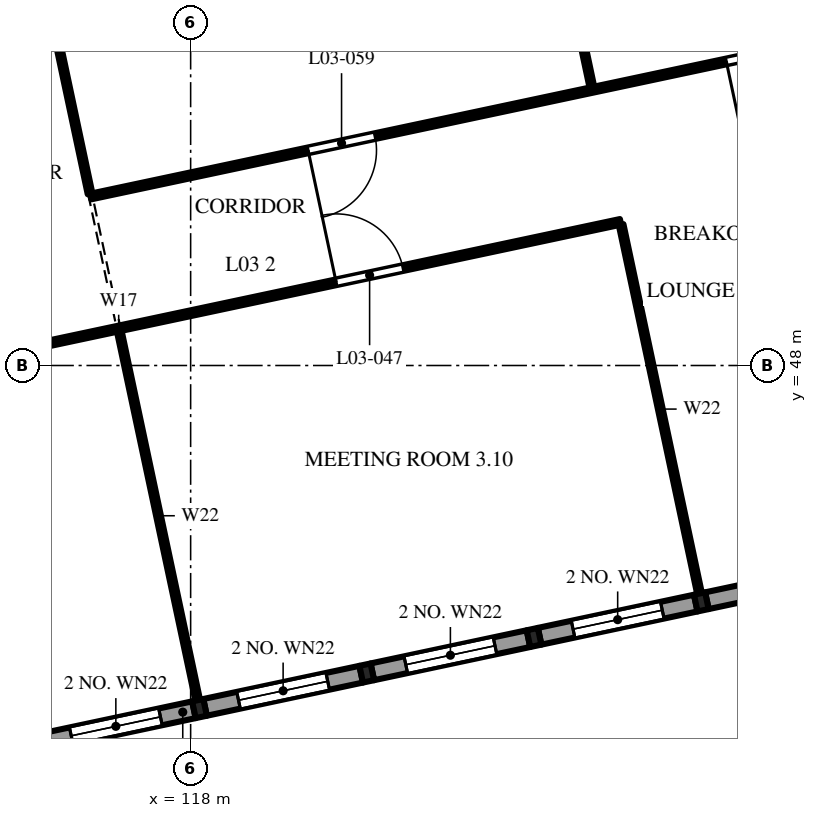
"""IFC4 building model, lengths in metres.
Left out: names, types, materials, properties, quantities, classifications, styles, units other than length and angle.
Written with IfcOpenShell. Run it as: python <this file> out.ifc"""

import sys

from ifc_helpers import new_model, si_unit, direction, frame, frame_2d, origin, origin_2d, place, context, subcontext, project, spatial, polyline, rectangle, i_section, outline, extrude, element, fill, save


model = new_model("IFC4")
c1 = context("Model", 3, precision=1e-05, world=origin(), true_north=direction((0.0, 1.0)))
c2 = subcontext(c1, "Body", "Model", "MODEL_VIEW")
j1 = project(units=[si_unit("LENGTHUNIT", "METRE"), si_unit("PLANEANGLEUNIT", "RADIAN")], contexts=[c1])
p1 = place(None, origin())
s1 = spatial("IfcSite", under=j1, at=p1, CompositionType="ELEMENT")
p2 = place(p1, origin())
s2 = spatial("IfcBuilding", under=s1, at=p2, CompositionType="ELEMENT")
p3 = place(p2, frame((0.0, 0.0, 16.8)))
s3 = spatial("IfcBuildingStorey", under=s2, at=p3, CompositionType="ELEMENT", Elevation=16.8)
for number, where, z_axis, x_axis in (
    (1, (118.233, 38.972, 0.0), (0.0, 0.0, 1.0), (0.978, 0.208, 0.0)),
    (2, (122.634, 39.908, 0.0), (0.0, 0.0, 1.0), (0.978, 0.208, 0.0)),
    (3, (127.036, 40.843, 0.0), (0.0, 0.0, 1.0), (0.978, 0.208, 0.0)),
    (4, (131.438, 41.779, 0.0), (0.0, 0.0, 1.0), (0.978, 0.208, 0.0)),
):
    element("IfcColumn", number, at=place(p3, frame(where, z_axis=z_axis, x_axis=x_axis)), inside=s3, PredefinedType="COLUMN", context=c2, shape_type="SweptSolid", body=[
        extrude(i_section(OverallWidth=0.3, OverallDepth=0.45, WebThickness=0.014, FlangeThickness=0.026, FilletRadius=0.027, at=origin_2d()), origin(), (0.0, 0.0, 1.0), 4.8),
    ])
p4 = place(p3, frame((113.978, 38.068, 0.0), z_axis=(0.0, 0.0, 1.0), x_axis=(0.978143927149, 0.207928972925, 0.0)))
e5 = element("IfcWall", 5, at=p4, inside=s3, PredefinedType="SOLIDWALL", context=c2, shape_type="SweptSolid", body=[
    extrude(outline(polyline([(0.0, 0.0), (4.2, 0.0), (4.2, 11.242), (0.0, 11.017), (0.0, 0.0)])), frame((0.0, 0.225, 0.0), z_axis=(0.0, -1.0, 0.0), x_axis=(1.0, 0.0, 0.0)), (0.0, 0.0, 1.0), 0.45),
])
p5 = place(p4, frame((0.9, 0.0, 0.9)))
e6 = element("IfcOpeningElement", 6, at=p5, cuts=e5, PredefinedType="OPENING", context=c2, shape_type="SweptSolid", body=[
    extrude(rectangle(XDim=2.4, YDim=2.4, at=frame_2d((1.2, 1.2))), frame((0.0, 0.235, 0.0), z_axis=(0.0, -1.0, 0.0), x_axis=(1.0, 0.0, 0.0)), (0.0, 0.0, 1.0), 0.47),
])
p6 = place(p4, frame((0.9, 0.0, 5.1)))
e7 = element("IfcOpeningElement", 7, at=p6, cuts=e5, PredefinedType="OPENING", context=c2, shape_type="SweptSolid", body=[
    extrude(rectangle(XDim=2.4, YDim=2.4, at=frame_2d((1.2, 1.2))), frame((0.0, 0.235, 0.0), z_axis=(0.0, -1.0, 0.0), x_axis=(1.0, 0.0, 0.0)), (0.0, 0.0, 1.0), 0.47),
])
p7 = place(p3, frame((118.379, 39.003, 0.0), z_axis=(0.0, 0.0, 1.0), x_axis=(0.978143927149, 0.207928972925, 0.0)))
e8 = element("IfcWall", 8, at=p7, inside=s3, PredefinedType="SOLIDWALL", context=c2, shape_type="SweptSolid", body=[
    extrude(outline(polyline([(0.0, 0.0), (4.2, 0.0), (4.2, 11.483), (0.0, 11.258), (0.0, 0.0)])), frame((0.0, 0.225, 0.0), z_axis=(0.0, -1.0, 0.0), x_axis=(1.0, 0.0, 0.0)), (0.0, 0.0, 1.0), 0.45),
])
p8 = place(p7, frame((0.9, 0.0, 0.9)))
e9 = element("IfcOpeningElement", 9, at=p8, cuts=e8, PredefinedType="OPENING", context=c2, shape_type="SweptSolid", body=[
    extrude(rectangle(XDim=2.4, YDim=2.4, at=frame_2d((1.2, 1.2))), frame((0.0, 0.235, 0.0), z_axis=(0.0, -1.0, 0.0), x_axis=(1.0, 0.0, 0.0)), (0.0, 0.0, 1.0), 0.47),
])
p9 = place(p7, frame((0.9, 0.0, 5.1)))
e10 = element("IfcOpeningElement", 10, at=p9, cuts=e8, PredefinedType="OPENING", context=c2, shape_type="SweptSolid", body=[
    extrude(rectangle(XDim=2.4, YDim=2.4, at=frame_2d((1.2, 1.2))), frame((0.0, 0.235, 0.0), z_axis=(0.0, -1.0, 0.0), x_axis=(1.0, 0.0, 0.0)), (0.0, 0.0, 1.0), 0.47),
])
p10 = place(p3, frame((122.781, 39.939, 0.0), z_axis=(0.0, 0.0, 1.0), x_axis=(0.978155748334, 0.207873355681, 0.0)))
e11 = element("IfcWall", 11, at=p10, inside=s3, PredefinedType="SOLIDWALL", context=c2, shape_type="SweptSolid", body=[
    extrude(outline(polyline([(0.0, 0.0), (4.2, 0.0), (4.2, 11.723), (0.0, 11.499), (0.0, 0.0)])), frame((0.0, 0.225, 0.0), z_axis=(0.0, -1.0, 0.0), x_axis=(1.0, 0.0, 0.0)), (0.0, 0.0, 1.0), 0.45),
])
p11 = place(p10, frame((0.9, 0.0, 0.9)))
e12 = element("IfcOpeningElement", 12, at=p11, cuts=e11, PredefinedType="OPENING", context=c2, shape_type="SweptSolid", body=[
    extrude(rectangle(XDim=2.4, YDim=2.4, at=frame_2d((1.2, 1.2))), frame((0.0, 0.235, 0.0), z_axis=(0.0, -1.0, 0.0), x_axis=(1.0, 0.0, 0.0)), (0.0, 0.0, 1.0), 0.47),
])
p12 = place(p10, frame((0.9, 0.0, 5.1)))
e13 = element("IfcOpeningElement", 13, at=p12, cuts=e11, PredefinedType="OPENING", context=c2, shape_type="SweptSolid", body=[
    extrude(rectangle(XDim=2.4, YDim=2.4, at=frame_2d((1.2, 1.2))), frame((0.0, 0.235, 0.0), z_axis=(0.0, -1.0, 0.0), x_axis=(1.0, 0.0, 0.0)), (0.0, 0.0, 1.0), 0.47),
])
p13 = place(p3, frame((127.183, 40.875, 0.0), z_axis=(0.0, 0.0, 1.0), x_axis=(0.978146440129, 0.207917150959, 0.0)))
e14 = element("IfcWall", 14, at=p13, inside=s3, PredefinedType="SOLIDWALL", context=c2, shape_type="SweptSolid", body=[
    extrude(outline(polyline([(0.0, 0.0), (4.2, 0.0), (4.2, 11.964), (0.0, 11.74), (0.0, 0.0)])), frame((0.0, 0.225, 0.0), z_axis=(0.0, -1.0, 0.0), x_axis=(1.0, 0.0, 0.0)), (0.0, 0.0, 1.0), 0.45),
])
p14 = place(p13, frame((0.9, 0.0, 0.9)))
e15 = element("IfcOpeningElement", 15, at=p14, cuts=e14, PredefinedType="OPENING", context=c2, shape_type="SweptSolid", body=[
    extrude(rectangle(XDim=2.4, YDim=2.4, at=frame_2d((1.2, 1.2))), frame((0.0, 0.235, 0.0), z_axis=(0.0, -1.0, 0.0), x_axis=(1.0, 0.0, 0.0)), (0.0, 0.0, 1.0), 0.47),
])
p15 = place(p13, frame((0.9, 0.0, 5.1)))
e16 = element("IfcOpeningElement", 16, at=p15, cuts=e14, PredefinedType="OPENING", context=c2, shape_type="SweptSolid", body=[
    extrude(rectangle(XDim=2.4, YDim=2.4, at=frame_2d((1.2, 1.2))), frame((0.0, 0.235, 0.0), z_axis=(0.0, -1.0, 0.0), x_axis=(1.0, 0.0, 0.0)), (0.0, 0.0, 1.0), 0.47),
])
p16 = place(p3, frame((131.584, 41.81, 0.0), z_axis=(0.0, 0.0, 1.0), x_axis=(0.978146440129, 0.207917150959, 0.0)))
e17 = element("IfcWall", 17, at=p16, inside=s3, PredefinedType="SOLIDWALL", context=c2, shape_type="SweptSolid", body=[
    extrude(outline(polyline([(0.0, 0.0), (4.2, 0.0), (4.2, 12.205), (0.0, 11.98), (0.0, 0.0)])), frame((0.0, 0.225, 0.0), z_axis=(0.0, -1.0, 0.0), x_axis=(1.0, 0.0, 0.0)), (0.0, 0.0, 1.0), 0.45),
])
p17 = place(p16, frame((0.9, 0.0, 0.45)))
e18 = element("IfcOpeningElement", 18, at=p17, cuts=e17, PredefinedType="OPENING", context=c2, shape_type="SweptSolid", body=[
    extrude(rectangle(XDim=2.4, YDim=3.3, at=frame_2d((1.2, 1.65))), frame((0.0, 0.235, 0.0), z_axis=(0.0, -1.0, 0.0), x_axis=(1.0, 0.0, 0.0)), (0.0, 0.0, 1.0), 0.47),
])
p18 = place(p16, frame((0.9, 0.0, 5.1)))
e19 = element("IfcOpeningElement", 19, at=p18, cuts=e17, PredefinedType="OPENING", context=c2, shape_type="SweptSolid", body=[
    extrude(rectangle(XDim=2.4, YDim=2.4, at=frame_2d((1.2, 1.2))), frame((0.0, 0.235, 0.0), z_axis=(0.0, -1.0, 0.0), x_axis=(1.0, 0.0, 0.0)), (0.0, 0.0, 1.0), 0.47),
])
p19 = place(p3, frame((80.893, 41.489, 0.0), z_axis=(0.0, 0.0, 1.0), x_axis=(0.97814724207, 0.20791337819, 0.0)))
e20 = element("IfcWall", 20, at=p19, inside=s3, PredefinedType="PARTITIONING", context=c2, shape_type="SweptSolid", body=[
    extrude(outline(polyline([(0.0, 0.0), (49.5, 0.0), (49.5, 9.336), (0.0, 6.688), (0.0, 0.0)])), frame((0.0, 0.075, 0.0), z_axis=(0.0, -1.0, 0.0), x_axis=(1.0, 0.0, 0.0)), (0.0, 0.0, 1.0), 0.15),
])
p20 = place(p19, frame((5.85, 0.0, 0.0)))
e21 = element("IfcOpeningElement", 21, at=p20, cuts=e20, PredefinedType="OPENING", context=c2, shape_type="SweptSolid", body=[
    extrude(rectangle(XDim=1.8, YDim=2.1, at=frame_2d((0.9, 1.05))), frame((0.0, 0.085, 0.0), z_axis=(0.0, -1.0, 0.0), x_axis=(1.0, 0.0, 0.0)), (0.0, 0.0, 1.0), 0.17),
])
p21 = place(p19, frame((17.25, 0.0, 0.0)))
e22 = element("IfcOpeningElement", 22, at=p21, cuts=e20, PredefinedType="OPENING", context=c2, shape_type="SweptSolid", body=[
    extrude(rectangle(XDim=1.5, YDim=2.1, at=frame_2d((0.75, 1.05))), frame((0.0, 0.085, 0.0), z_axis=(0.0, -1.0, 0.0), x_axis=(1.0, 0.0, 0.0)), (0.0, 0.0, 1.0), 0.17),
])
p22 = place(p19, frame((28.35, 0.0, 0.0)))
e23 = element("IfcOpeningElement", 23, at=p22, cuts=e20, PredefinedType="OPENING", context=c2, shape_type="SweptSolid", body=[
    extrude(rectangle(XDim=1.8, YDim=2.1, at=frame_2d((0.9, 1.05))), frame((0.0, 0.085, 0.0), z_axis=(0.0, -1.0, 0.0), x_axis=(1.0, 0.0, 0.0)), (0.0, 0.0, 1.0), 0.17),
])
p23 = place(p19, frame((41.85, 0.0, 0.0)))
e24 = element("IfcOpeningElement", 24, at=p23, cuts=e20, PredefinedType="OPENING", context=c2, shape_type="SweptSolid", body=[
    extrude(rectangle(XDim=1.8, YDim=2.1, at=frame_2d((0.9, 1.05))), frame((0.0, 0.085, 0.0), z_axis=(0.0, -1.0, 0.0), x_axis=(1.0, 0.0, 0.0)), (0.0, 0.0, 1.0), 0.17),
])
p24 = place(p3, frame((118.186, 39.192, 0.0), z_axis=(0.0, 0.0, 1.0), x_axis=(-0.207904355568, 0.978149159861, 0.0)))
e25 = element("IfcWall", 25, at=p24, inside=s3, PredefinedType="PARTITIONING", context=c2, shape_type="SweptSolid", body=[
    extrude(outline(polyline([(0.0, 0.0), (9.925, 0.0), (9.925, 7.899), (0.0, 7.899), (0.0, 0.0)])), frame((0.0, 0.062, 0.0), z_axis=(0.0, -1.0, 0.0), x_axis=(1.0, 0.0, 0.0)), (0.0, 0.0, 1.0), 0.125),
])
p25 = place(p3, frame((131.391, 41.999, 0.0), z_axis=(0.0, 0.0, 1.0), x_axis=(-0.20790935802, 0.978148096582, 0.0)))
e26 = element("IfcWall", 26, at=p25, inside=s3, PredefinedType="PARTITIONING", context=c2, shape_type="SweptSolid", body=[
    extrude(outline(polyline([(0.0, 0.0), (9.925, 0.0), (9.925, 8.622), (0.0, 8.622), (0.0, 0.0)])), frame((0.0, 0.062, 0.0), z_axis=(0.0, -1.0, 0.0), x_axis=(1.0, 0.0, 0.0)), (0.0, 0.0, 1.0), 0.125),
])
p26 = place(p3, frame((115.369, 52.446, 0.0), z_axis=(0.0, 0.0, 1.0), x_axis=(0.978147680869, 0.207911313813, 0.0)))
e27 = element("IfcWall", 27, at=p26, inside=s3, PredefinedType="PARTITIONING", context=c2, shape_type="SweptSolid", body=[
    extrude(outline(polyline([(0.0, 0.0), (40.5, 0.0), (40.5, 10.595), (0.0, 8.428), (0.0, 0.0)])), frame((0.0, 0.075, 0.0), z_axis=(0.0, -1.0, 0.0), x_axis=(1.0, 0.0, 0.0)), (0.0, 0.0, 1.0), 0.15),
])
p27 = place(p26, frame((5.85, 0.0, 0.0)))
e28 = element("IfcOpeningElement", 28, at=p27, cuts=e27, PredefinedType="OPENING", context=c2, shape_type="SweptSolid", body=[
    extrude(rectangle(XDim=1.8, YDim=2.1, at=frame_2d((0.9, 1.05))), frame((0.0, 0.085, 0.0), z_axis=(0.0, -1.0, 0.0), x_axis=(1.0, 0.0, 0.0)), (0.0, 0.0, 1.0), 0.17),
])
p28 = place(p26, frame((17.1, 0.0, 0.0)))
e29 = element("IfcOpeningElement", 29, at=p28, cuts=e27, PredefinedType="OPENING", context=c2, shape_type="SweptSolid", body=[
    extrude(rectangle(XDim=1.8, YDim=2.1, at=frame_2d((0.9, 1.05))), frame((0.0, 0.085, 0.0), z_axis=(0.0, -1.0, 0.0), x_axis=(1.0, 0.0, 0.0)), (0.0, 0.0, 1.0), 0.17),
])
p29 = place(p26, frame((28.35, 0.0, 0.0)))
e30 = element("IfcOpeningElement", 30, at=p29, cuts=e27, PredefinedType="OPENING", context=c2, shape_type="SweptSolid", body=[
    extrude(rectangle(XDim=1.8, YDim=2.1, at=frame_2d((0.9, 1.05))), frame((0.0, 0.085, 0.0), z_axis=(0.0, -1.0, 0.0), x_axis=(1.0, 0.0, 0.0)), (0.0, 0.0, 1.0), 0.17),
])
p30 = place(p26, frame((37.75, 0.0, 0.0)))
e31 = element("IfcOpeningElement", 31, at=p30, cuts=e27, PredefinedType="OPENING", context=c2, shape_type="SweptSolid", body=[
    extrude(rectangle(XDim=1.0, YDim=2.1, at=frame_2d((0.5, 1.05))), frame((0.0, 0.085, 0.0), z_axis=(0.0, -1.0, 0.0), x_axis=(1.0, 0.0, 0.0)), (0.0, 0.0, 1.0), 0.17),
])
p31 = place(p3, frame((113.29, 62.228, 0.0), z_axis=(0.0, 0.0, 1.0), x_axis=(0.20790935802, -0.978148096582, 0.0)))
e32 = element("IfcWall", 32, at=p31, inside=s3, PredefinedType="PARTITIONING", context=c2, shape_type="SweptSolid", body=[
    extrude(outline(polyline([(0.0, 0.0), (9.925, 0.0), (9.925, 7.899), (0.0, 7.899), (0.0, 0.0)])), frame((0.0, 0.062, 0.0), z_axis=(0.0, -1.0, 0.0), x_axis=(1.0, 0.0, 0.0)), (0.0, 0.0, 1.0), 0.125),
])
p32 = place(p3, frame((126.495, 65.034, 0.0), z_axis=(0.0, 0.0, 1.0), x_axis=(0.207904355568, -0.978149159861, 0.0)))
e33 = element("IfcWall", 33, at=p32, inside=s3, PredefinedType="PARTITIONING", context=c2, shape_type="SweptSolid", body=[
    extrude(outline(polyline([(0.0, 0.0), (9.925, 0.0), (9.925, 8.622), (0.0, 8.622), (0.0, 0.0)])), frame((0.0, 0.062, 0.0), z_axis=(0.0, -1.0, 0.0), x_axis=(1.0, 0.0, 0.0)), (0.0, 0.0, 1.0), 0.125),
])
p33 = place(p5, origin())
e34 = element("IfcWindow", 34, at=p33, inside=s3, PartitioningType="SINGLE_PANEL", PredefinedType="WINDOW", context=c2, shape_type="SweptSolid", body=[
    extrude(rectangle(XDim=2.4, YDim=2.4, at=frame_2d((1.2, 1.2))), frame((0.0, 0.03, 0.0), z_axis=(0.0, -1.0, 0.0), x_axis=(1.0, 0.0, 0.0)), (0.0, 0.0, 1.0), 0.06),
])
fill(e6, e34)
p34 = place(p6, origin())
e35 = element("IfcWindow", 35, at=p34, inside=s3, PartitioningType="SINGLE_PANEL", PredefinedType="WINDOW", context=c2, shape_type="SweptSolid", body=[
    extrude(rectangle(XDim=2.4, YDim=2.4, at=frame_2d((1.2, 1.2))), frame((0.0, 0.03, 0.0), z_axis=(0.0, -1.0, 0.0), x_axis=(1.0, 0.0, 0.0)), (0.0, 0.0, 1.0), 0.06),
])
fill(e7, e35)
p35 = place(p8, origin())
e36 = element("IfcWindow", 36, at=p35, inside=s3, PartitioningType="SINGLE_PANEL", PredefinedType="WINDOW", context=c2, shape_type="SweptSolid", body=[
    extrude(rectangle(XDim=2.4, YDim=2.4, at=frame_2d((1.2, 1.2))), frame((0.0, 0.03, 0.0), z_axis=(0.0, -1.0, 0.0), x_axis=(1.0, 0.0, 0.0)), (0.0, 0.0, 1.0), 0.06),
])
fill(e9, e36)
p36 = place(p9, origin())
e37 = element("IfcWindow", 37, at=p36, inside=s3, PartitioningType="SINGLE_PANEL", PredefinedType="WINDOW", context=c2, shape_type="SweptSolid", body=[
    extrude(rectangle(XDim=2.4, YDim=2.4, at=frame_2d((1.2, 1.2))), frame((0.0, 0.03, 0.0), z_axis=(0.0, -1.0, 0.0), x_axis=(1.0, 0.0, 0.0)), (0.0, 0.0, 1.0), 0.06),
])
fill(e10, e37)
p37 = place(p11, origin())
e38 = element("IfcWindow", 38, at=p37, inside=s3, PartitioningType="SINGLE_PANEL", PredefinedType="WINDOW", context=c2, shape_type="SweptSolid", body=[
    extrude(rectangle(XDim=2.4, YDim=2.4, at=frame_2d((1.2, 1.2))), frame((0.0, 0.03, 0.0), z_axis=(0.0, -1.0, 0.0), x_axis=(1.0, 0.0, 0.0)), (0.0, 0.0, 1.0), 0.06),
])
fill(e12, e38)
p38 = place(p12, origin())
e39 = element("IfcWindow", 39, at=p38, inside=s3, PartitioningType="SINGLE_PANEL", PredefinedType="WINDOW", context=c2, shape_type="SweptSolid", body=[
    extrude(rectangle(XDim=2.4, YDim=2.4, at=frame_2d((1.2, 1.2))), frame((0.0, 0.03, 0.0), z_axis=(0.0, -1.0, 0.0), x_axis=(1.0, 0.0, 0.0)), (0.0, 0.0, 1.0), 0.06),
])
fill(e13, e39)
p39 = place(p14, origin())
e40 = element("IfcWindow", 40, at=p39, inside=s3, PartitioningType="SINGLE_PANEL", PredefinedType="WINDOW", context=c2, shape_type="SweptSolid", body=[
    extrude(rectangle(XDim=2.4, YDim=2.4, at=frame_2d((1.2, 1.2))), frame((0.0, 0.03, 0.0), z_axis=(0.0, -1.0, 0.0), x_axis=(1.0, 0.0, 0.0)), (0.0, 0.0, 1.0), 0.06),
])
fill(e15, e40)
p40 = place(p15, origin())
e41 = element("IfcWindow", 41, at=p40, inside=s3, PartitioningType="SINGLE_PANEL", PredefinedType="WINDOW", context=c2, shape_type="SweptSolid", body=[
    extrude(rectangle(XDim=2.4, YDim=2.4, at=frame_2d((1.2, 1.2))), frame((0.0, 0.03, 0.0), z_axis=(0.0, -1.0, 0.0), x_axis=(1.0, 0.0, 0.0)), (0.0, 0.0, 1.0), 0.06),
])
fill(e16, e41)
p41 = place(p23, origin())
e42 = element("IfcDoor", 42, at=p41, inside=s3, OperationType="DOUBLE_DOOR_SINGLE_SWING", PredefinedType="DOOR", context=c2, shape_type="SweptSolid", body=[
    extrude(rectangle(XDim=1.8, YDim=2.1, at=frame_2d((0.9, 1.05))), frame((0.0, 0.025, 0.0), z_axis=(0.0, -1.0, 0.0), x_axis=(1.0, 0.0, 0.0)), (0.0, 0.0, 1.0), 0.05),
])
fill(e24, e42)
p42 = place(p27, frame((1.8, 0.0, 0.0), z_axis=(0.0, 0.0, 1.0), x_axis=(-1.0, 0.0, 0.0)))
e43 = element("IfcDoor", 43, at=p42, inside=s3, OperationType="DOUBLE_DOOR_SINGLE_SWING", PredefinedType="DOOR", context=c2, shape_type="SweptSolid", body=[
    extrude(rectangle(XDim=1.8, YDim=2.1, at=frame_2d((0.9, 1.05))), frame((0.0, 0.025, 0.0), z_axis=(0.0, -1.0, 0.0), x_axis=(1.0, 0.0, 0.0)), (0.0, 0.0, 1.0), 0.05),
])
fill(e28, e43)
p43 = place(p28, frame((1.8, 0.0, 0.0), z_axis=(0.0, 0.0, 1.0), x_axis=(-1.0, 0.0, 0.0)))
e44 = element("IfcDoor", 44, at=p43, inside=s3, OperationType="DOUBLE_DOOR_SINGLE_SWING", PredefinedType="DOOR", context=c2, shape_type="SweptSolid", body=[
    extrude(rectangle(XDim=1.8, YDim=2.1, at=frame_2d((0.9, 1.05))), frame((0.0, 0.025, 0.0), z_axis=(0.0, -1.0, 0.0), x_axis=(1.0, 0.0, 0.0)), (0.0, 0.0, 1.0), 0.05),
])
fill(e29, e44)
save(model, sys.argv[1])
